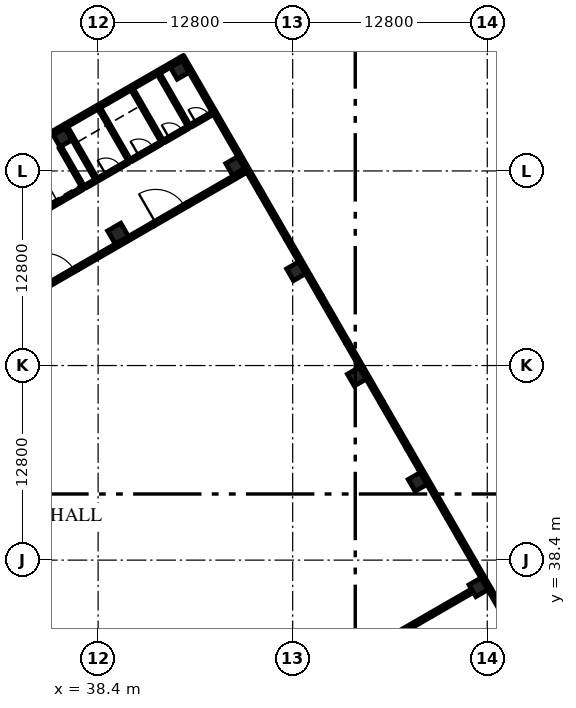
"""IFC4 building model, lengths in metres.
Left out: names, types, materials, properties, quantities, classifications, styles, units other than length and angle.
Written with IfcOpenShell. Run it as: python <this file> out.ifc"""

import sys

from ifc_helpers import new_model, si_unit, direction, frame, frame_2d, origin, origin_2d, place, context, subcontext, project, spatial, rectangle, extrude, element, fill, save


model = new_model("IFC4")
c1 = context("Model", 3, precision=1e-05, world=origin(), true_north=direction((0.0, 1.0)))
c2 = subcontext(c1, "Body", "Model", "MODEL_VIEW")
j1 = project(units=[si_unit("LENGTHUNIT", "METRE"), si_unit("PLANEANGLEUNIT", "RADIAN")], contexts=[c1])
p1 = place(None, origin())
s1 = spatial("IfcSite", under=j1, at=p1, CompositionType="ELEMENT")
p2 = place(p1, origin())
s2 = spatial("IfcBuilding", under=s1, at=p2, CompositionType="ELEMENT")
p3 = place(p2, frame((0.0, 0.0, 6.0)))
s3 = spatial("IfcBuildingStorey", under=s2, at=p3, CompositionType="ELEMENT", Elevation=6.0)
for number, where, z_axis, x_axis in (
    (1, (63.417, 36.614, 0.0), (0.0, 0.0, 1.0), (-0.5, 0.866, 0.0)),
    (2, (59.417, 43.542, 0.0), (0.0, 0.0, 1.0), (-0.5, 0.866, 0.0)),
    (3, (55.417, 50.47, 0.0), (0.0, 0.0, 1.0), (-0.5, 0.866, 0.0)),
    (4, (51.417, 57.399, 0.0), (0.0, 0.0, 1.0), (-0.5, 0.866, 0.0)),
):
    element("IfcColumn", number, at=place(p3, frame(where, z_axis=z_axis, x_axis=x_axis)), inside=s3, PredefinedType="COLUMN", context=c2, shape_type="SweptSolid", body=[
        extrude(rectangle(XDim=0.9, YDim=0.9, at=origin_2d()), origin(), (0.0, 0.0, 1.0), 5.4),
    ])
p4 = place(p3, frame((39.71, 59.877, 0.0), z_axis=(0.0, 0.0, 1.0), x_axis=(-0.5, 0.866025403784, 0.0)))
e5 = element("IfcColumn", 5, at=p4, inside=s3, PredefinedType="COLUMN", context=c2, shape_type="SweptSolid", body=[
    extrude(rectangle(XDim=1.0, YDim=1.0, at=origin_2d()), origin(), (0.0, 0.0, 1.0), 5.4),
])
for number, where, z_axis, x_axis in (
    (6, (47.417, 64.327, 0.0), (0.0, 0.0, 1.0), (-0.5, 0.866, 0.0)),
    (7, (36.06, 66.199, 0.0), (0.0, 0.0, 1.0), (-0.5, 0.866, 0.0)),
    (8, (43.767, 70.649, 0.0), (0.0, 0.0, 1.0), (-0.5, 0.866, 0.0)),
):
    element("IfcColumn", number, at=place(p3, frame(where, z_axis=z_axis, x_axis=x_axis)), inside=s3, PredefinedType="COLUMN", context=c2, shape_type="SweptSolid", body=[
        extrude(rectangle(XDim=0.9, YDim=0.9, at=origin_2d()), origin(), (0.0, 0.0, 1.0), 5.4),
    ])
p5 = place(p3, frame((63.172, 38.189, 0.0), z_axis=(0.0, 0.0, 1.0), x_axis=(0.499982597115, -0.866035451112, 0.0)))
e9 = element("IfcWall", 9, at=p5, inside=s3, PredefinedType="SOLIDWALL", context=c2, shape_type="SweptSolid", body=[
    extrude(rectangle(XDim=3.737, YDim=0.25, at=frame_2d((1.869, 0.0))), origin(), (0.0, 0.0, 1.0), 5.1),
])
p6 = place(p3, frame((61.422, 41.22, 0.0), z_axis=(0.0, 0.0, 1.0), x_axis=(0.499980071345, -0.866036909293, 0.0)))
e10 = element("IfcWall", 10, at=p6, inside=s3, PredefinedType="SOLIDWALL", context=c2, shape_type="SweptSolid", body=[
    extrude(rectangle(XDim=3.5, YDim=0.25, at=frame_2d((1.75, 0.0))), origin(), (0.0, 0.0, 1.0), 5.1),
])
p7 = place(p6, frame((0.25, 0.0, 1.0)))
e11 = element("IfcOpeningElement", 11, at=p7, cuts=e10, PredefinedType="OPENING", context=c2, shape_type="SweptSolid", body=[
    extrude(rectangle(XDim=3.0, YDim=2.8, at=frame_2d((1.5, 1.4))), frame((0.0, 0.135, 0.0), z_axis=(0.0, -1.0, 0.0), x_axis=(1.0, 0.0, 0.0)), (0.0, 0.0, 1.0), 0.27),
])
p8 = place(p3, frame((58.79, 45.778, 0.0), z_axis=(0.0, 0.0, 1.0), x_axis=(0.50001558016, -0.866016408388, 0.0)))
e12 = element("IfcWall", 12, at=p8, inside=s3, PredefinedType="SOLIDWALL", context=c2, shape_type="SweptSolid", body=[
    extrude(rectangle(XDim=5.263, YDim=0.25, at=frame_2d((2.631, 0.0))), origin(), (0.0, 0.0, 1.0), 5.1),
])
p9 = place(p3, frame((57.04, 48.809, 0.0), z_axis=(0.0, 0.0, 1.0), x_axis=(0.500010275428, -0.866019471182, 0.0)))
e13 = element("IfcWall", 13, at=p9, inside=s3, PredefinedType="SOLIDWALL", context=c2, shape_type="SweptSolid", body=[
    extrude(rectangle(XDim=3.5, YDim=0.25, at=frame_2d((1.75, 0.0))), origin(), (0.0, 0.0, 1.0), 5.1),
])
p10 = place(p9, frame((0.25, 0.0, 1.0)))
e14 = element("IfcOpeningElement", 14, at=p10, cuts=e13, PredefinedType="OPENING", context=c2, shape_type="SweptSolid", body=[
    extrude(rectangle(XDim=3.0, YDim=2.8, at=frame_2d((1.5, 1.4))), frame((0.0, 0.135, 0.0), z_axis=(0.0, -1.0, 0.0), x_axis=(1.0, 0.0, 0.0)), (0.0, 0.0, 1.0), 0.27),
])
p11 = place(p3, frame((54.79, 52.707, 0.0), z_axis=(0.0, 0.0, 1.0), x_axis=(0.499990139034, -0.866031096941, 0.0)))
e15 = element("IfcWall", 15, at=p11, inside=s3, PredefinedType="SOLIDWALL", context=c2, shape_type="SweptSolid", body=[
    extrude(rectangle(XDim=4.5, YDim=0.25, at=frame_2d((2.25, 0.0))), origin(), (0.0, 0.0, 1.0), 5.1),
])
p12 = place(p3, frame((53.04, 55.738, 0.0), z_axis=(0.0, 0.0, 1.0), x_axis=(0.500010275428, -0.866019471182, 0.0)))
e16 = element("IfcWall", 16, at=p12, inside=s3, PredefinedType="SOLIDWALL", context=c2, shape_type="SweptSolid", body=[
    extrude(rectangle(XDim=3.5, YDim=0.25, at=frame_2d((1.75, 0.0))), origin(), (0.0, 0.0, 1.0), 5.1),
])
p13 = place(p12, frame((0.25, 0.0, 1.0)))
e17 = element("IfcOpeningElement", 17, at=p13, cuts=e16, PredefinedType="OPENING", context=c2, shape_type="SweptSolid", body=[
    extrude(rectangle(XDim=3.0, YDim=2.8, at=frame_2d((1.5, 1.4))), frame((0.0, 0.135, 0.0), z_axis=(0.0, -1.0, 0.0), x_axis=(1.0, 0.0, 0.0)), (0.0, 0.0, 1.0), 0.27),
])
p14 = place(p3, frame((50.821, 59.581, 0.0), z_axis=(0.0, 0.0, 1.0), x_axis=(0.499990705068, -0.866030770149, 0.0)))
e18 = element("IfcWall", 18, at=p14, inside=s3, PredefinedType="SOLIDWALL", context=c2, shape_type="SweptSolid", body=[
    extrude(rectangle(XDim=4.438, YDim=0.25, at=frame_2d((2.219, 0.0))), origin(), (0.0, 0.0, 1.0), 5.1),
])
p15 = place(p3, frame((49.071, 62.612, 0.0), z_axis=(0.0, 0.0, 1.0), x_axis=(0.500010275428, -0.866019471182, 0.0)))
e19 = element("IfcWall", 19, at=p15, inside=s3, PredefinedType="SOLIDWALL", context=c2, shape_type="SweptSolid", body=[
    extrude(rectangle(XDim=3.5, YDim=0.25, at=frame_2d((1.75, 0.0))), origin(), (0.0, 0.0, 1.0), 5.1),
])
p16 = place(p15, frame((0.25, 0.0, 1.0)))
e20 = element("IfcOpeningElement", 20, at=p16, cuts=e19, PredefinedType="OPENING", context=c2, shape_type="SweptSolid", body=[
    extrude(rectangle(XDim=3.0, YDim=2.8, at=frame_2d((1.5, 1.4))), frame((0.0, 0.135, 0.0), z_axis=(0.0, -1.0, 0.0), x_axis=(1.0, 0.0, 0.0)), (0.0, 0.0, 1.0), 0.27),
])
p17 = place(p3, frame((43.915, 71.542, 0.0), z_axis=(0.0, 0.0, 1.0), x_axis=(0.500001855621, -0.866024332438, 0.0)))
e21 = element("IfcWall", 21, at=p17, inside=s3, PredefinedType="SOLIDWALL", context=c2, shape_type="SweptSolid", body=[
    extrude(rectangle(XDim=10.312, YDim=0.25, at=frame_2d((5.156, 0.0))), origin(), (0.0, 0.0, 1.0), 5.1),
])
p18 = place(p3, frame((27.935, 62.172, 0.0), z_axis=(0.0, 0.0, 1.0), x_axis=(0.86604045752, 0.499973925258, 0.0)))
e22 = element("IfcWall", 22, at=p18, inside=s3, PredefinedType="SOLIDWALL", context=c2, shape_type="SweptSolid", body=[
    extrude(rectangle(XDim=8.6, YDim=0.25, at=frame_2d((4.3, 0.0))), origin(), (0.0, 0.0, 1.0), 5.1),
])
p19 = place(p3, frame((36.249, 66.972, 0.0), z_axis=(0.0, 0.0, 1.0), x_axis=(0.866013253925, 0.500021043584, 0.0)))
e23 = element("IfcWall", 23, at=p19, inside=s3, PredefinedType="SOLIDWALL", context=c2, shape_type="SweptSolid", body=[
    extrude(rectangle(XDim=8.8, YDim=0.25, at=frame_2d((4.4, 0.0))), origin(), (0.0, 0.0, 1.0), 5.1),
])
p20 = place(p3, frame((35.383, 66.472, 0.0), z_axis=(0.0, 0.0, 1.0), x_axis=(0.866010750942, 0.50002537861, 0.0)))
e24 = element("IfcWall", 24, at=p20, inside=s3, PredefinedType="SOLIDWALL", context=c2, shape_type="SweptSolid", body=[
    extrude(rectangle(XDim=1.0, YDim=0.25, at=frame_2d((0.5, 0.0))), origin(), (0.0, 0.0, 1.0), 5.1),
])
p21 = place(p3, frame((37.445, 62.899, 0.0), z_axis=(0.0, 0.0, 1.0), x_axis=(-0.500026960575, 0.86600983753, 0.0)))
e25 = element("IfcWall", 25, at=p21, inside=s3, PredefinedType="SOLIDWALL", context=c2, shape_type="SweptSolid", body=[
    extrude(rectangle(XDim=3.1, YDim=0.2, at=frame_2d((1.55, 0.0))), origin(), (0.0, 0.0, 1.0), 5.1),
])
p22 = place(p3, frame((31.599, 59.524, 0.0), z_axis=(0.0, 0.0, 1.0), x_axis=(0.866027239912, 0.49999681972, 0.0)))
e26 = element("IfcWall", 26, at=p22, inside=s3, PredefinedType="SOLIDWALL", context=c2, shape_type="SweptSolid", body=[
    extrude(rectangle(XDim=6.65, YDim=0.2, at=frame_2d((3.325, 0.0))), origin(), (0.0, 0.0, 1.0), 5.1),
])
for number, where, z_axis, x_axis in (
    (27, (38.311, 63.399, 0.0), (0.0, 0.0, 1.0), (-0.5, 0.866, 0.0)),
    (28, (40.476, 64.649, 0.0), (0.0, 0.0, 1.0), (-0.5, 0.866, 0.0)),
    (29, (42.641, 65.899, 0.0), (0.0, 0.0, 1.0), (-0.5, 0.866, 0.0)),
):
    element("IfcWall", number, at=place(p3, frame(where, z_axis=z_axis, x_axis=x_axis)), inside=s3, PredefinedType="SOLIDWALL", context=c2, shape_type="SweptSolid", body=[
        extrude(rectangle(XDim=4.0, YDim=0.2, at=frame_2d((2.0, 0.0))), origin(), (0.0, 0.0, 1.0), 5.1),
    ])
p23 = place(p3, frame((38.398, 63.449, 0.0), z_axis=(0.0, 0.0, 1.0), x_axis=(0.86602648383, 0.499998129301, 0.0)))
e30 = element("IfcWall", 30, at=p23, inside=s3, PredefinedType="SOLIDWALL", context=c2, shape_type="SweptSolid", body=[
    extrude(rectangle(XDim=2.3, YDim=0.2, at=frame_2d((1.15, 0.0))), origin(), (0.0, 0.0, 1.0), 5.1),
])
p24 = place(p23, frame((0.6, 0.0, 0.0)))
e31 = element("IfcOpeningElement", 31, at=p24, cuts=e30, PredefinedType="OPENING", context=c2, shape_type="SweptSolid", body=[
    extrude(rectangle(XDim=1.1, YDim=2.1, at=frame_2d((0.55, 1.05))), frame((0.0, 0.11, 0.0), z_axis=(0.0, -1.0, 0.0), x_axis=(1.0, 0.0, 0.0)), (0.0, 0.0, 1.0), 0.22),
])
p25 = place(p3, frame((40.563, 64.699, 0.0), z_axis=(0.0, 0.0, 1.0), x_axis=(0.86602648383, 0.499998129301, 0.0)))
e32 = element("IfcWall", 32, at=p25, inside=s3, PredefinedType="SOLIDWALL", context=c2, shape_type="SweptSolid", body=[
    extrude(rectangle(XDim=2.3, YDim=0.2, at=frame_2d((1.15, 0.0))), origin(), (0.0, 0.0, 1.0), 5.1),
])
p26 = place(p25, frame((0.6, 0.0, 0.0)))
e33 = element("IfcOpeningElement", 33, at=p26, cuts=e32, PredefinedType="OPENING", context=c2, shape_type="SweptSolid", body=[
    extrude(rectangle(XDim=1.1, YDim=2.1, at=frame_2d((0.55, 1.05))), frame((0.0, 0.11, 0.0), z_axis=(0.0, -1.0, 0.0), x_axis=(1.0, 0.0, 0.0)), (0.0, 0.0, 1.0), 0.22),
])
p27 = place(p3, frame((26.178, 15.114, 0.0), z_axis=(0.0, 0.0, 1.0), x_axis=(0.866025540551, 0.499999763114, 0.0)))
e34 = element("IfcWall", 34, at=p27, inside=s3, PredefinedType="SOLIDWALL", context=c2, shape_type="SweptSolid", body=[
    extrude(rectangle(XDim=39.4, YDim=0.25, at=frame_2d((19.7, 0.0))), origin(), (0.0, 0.0, 1.0), 10.2),
])
p28 = place(p3, frame((60.3, 34.814, 0.0), z_axis=(0.0, 0.0, 1.0), x_axis=(0.866035871367, 0.499981869177, 0.0)))
e35 = element("IfcWall", 35, at=p28, inside=s3, PredefinedType="SOLIDWALL", context=c2, shape_type="SweptSolid", body=[
    extrude(rectangle(XDim=3.15, YDim=0.25, at=frame_2d((1.575, 0.0))), origin(), (0.0, 0.0, 1.0), 4.5),
])
p29 = place(p3, frame((34.696, 56.26, 0.0), z_axis=(0.0, 0.0, 1.0), x_axis=(0.866019956843, 0.50000943426, 0.0)))
e36 = element("IfcWall", 36, at=p29, inside=s3, PredefinedType="SOLIDWALL", context=c2, shape_type="SweptSolid", body=[
    extrude(rectangle(XDim=2.7, YDim=0.25, at=frame_2d((1.35, 0.0))), origin(), (0.0, 0.0, 1.0), 4.5),
])
p30 = place(p29, frame((0.25, 0.0, 0.0)))
e37 = element("IfcOpeningElement", 37, at=p30, cuts=e36, PredefinedType="OPENING", context=c2, shape_type="SweptSolid", body=[
    extrude(rectangle(XDim=2.2, YDim=2.1, at=frame_2d((1.1, 1.05))), frame((0.0, 0.135, 0.0), z_axis=(0.0, -1.0, 0.0), x_axis=(1.0, 0.0, 0.0)), (0.0, 0.0, 1.0), 0.27),
])
p31 = place(p3, frame((37.034, 57.611, 0.0), z_axis=(0.0, 0.0, 1.0), x_axis=(0.866015111908, 0.50001782563, 0.0)))
e38 = element("IfcWall", 38, at=p31, inside=s3, PredefinedType="SOLIDWALL", context=c2, shape_type="SweptSolid", body=[
    extrude(rectangle(XDim=5.7, YDim=0.25, at=frame_2d((2.85, 0.0))), origin(), (0.0, 0.0, 1.0), 4.5),
])
p32 = place(p3, frame((41.971, 60.461, 0.0), z_axis=(0.0, 0.0, 1.0), x_axis=(0.866059108428, 0.4999416173, 0.0)))
e39 = element("IfcWall", 39, at=p32, inside=s3, PredefinedType="SOLIDWALL", context=c2, shape_type="SweptSolid", body=[
    extrude(rectangle(XDim=2.7, YDim=0.25, at=frame_2d((1.35, 0.0))), origin(), (0.0, 0.0, 1.0), 4.5),
])
p33 = place(p32, frame((0.25, 0.0, 0.0)))
e40 = element("IfcOpeningElement", 40, at=p33, cuts=e39, PredefinedType="OPENING", context=c2, shape_type="SweptSolid", body=[
    extrude(rectangle(XDim=2.2, YDim=2.1, at=frame_2d((1.1, 1.05))), frame((0.0, 0.135, 0.0), z_axis=(0.0, -1.0, 0.0), x_axis=(1.0, 0.0, 0.0)), (0.0, 0.0, 1.0), 0.27),
])
p34 = place(p3, frame((44.309, 61.811, 0.0), z_axis=(0.0, 0.0, 1.0), x_axis=(0.866018331238, 0.50001224981, 0.0)))
e41 = element("IfcWall", 41, at=p34, inside=s3, PredefinedType="SOLIDWALL", context=c2, shape_type="SweptSolid", body=[
    extrude(rectangle(XDim=4.4, YDim=0.25, at=frame_2d((2.2, 0.0))), origin(), (0.0, 0.0, 1.0), 4.5),
])
p35 = place(p3, frame((44.395, 66.912, 0.0), z_axis=(0.0, 0.0, 1.0), x_axis=(-0.49999894854, 0.866026010844, 0.0)))
e42 = element("IfcWall", 42, at=p35, inside=s3, PredefinedType="PARTITIONING", context=c2, shape_type="SweptSolid", body=[
    extrude(rectangle(XDim=4.0, YDim=0.2, at=frame_2d((2.0, 0.0))), origin(), (0.0, 0.0, 1.0), 4.5),
])
p36 = place(p3, frame((42.728, 65.949, 0.0), z_axis=(0.0, 0.0, 1.0), x_axis=(0.866036312054, 0.499981105847, 0.0)))
e43 = element("IfcWall", 43, at=p36, inside=s3, PredefinedType="PARTITIONING", context=c2, shape_type="SweptSolid", body=[
    extrude(rectangle(XDim=1.825, YDim=0.2, at=frame_2d((0.912, 0.0))), origin(), (0.0, 0.0, 1.0), 4.5),
])
p37 = place(p36, frame((0.413, 0.0, 0.0)))
e44 = element("IfcOpeningElement", 44, at=p37, cuts=e43, PredefinedType="OPENING", context=c2, shape_type="SweptSolid", body=[
    extrude(rectangle(XDim=1.0, YDim=2.1, at=frame_2d((0.5, 1.05))), frame((0.0, 0.11, 0.0), z_axis=(0.0, -1.0, 0.0), x_axis=(1.0, 0.0, 0.0)), (0.0, 0.0, 1.0), 0.22),
])
p38 = place(p3, frame((44.481, 66.962, 0.0), z_axis=(0.0, 0.0, 1.0), x_axis=(0.866027799164, 0.499995851058, 0.0)))
e45 = element("IfcWall", 45, at=p38, inside=s3, PredefinedType="PARTITIONING", context=c2, shape_type="SweptSolid", body=[
    extrude(rectangle(XDim=1.675, YDim=0.2, at=frame_2d((0.837, 0.0))), origin(), (0.0, 0.0, 1.0), 4.5),
])
p39 = place(p38, frame((0.413, 0.0, 0.0)))
e46 = element("IfcOpeningElement", 46, at=p39, cuts=e45, PredefinedType="OPENING", context=c2, shape_type="SweptSolid", body=[
    extrude(rectangle(XDim=1.0, YDim=2.1, at=frame_2d((0.5, 1.05))), frame((0.0, 0.11, 0.0), z_axis=(0.0, -1.0, 0.0), x_axis=(1.0, 0.0, 0.0)), (0.0, 0.0, 1.0), 0.22),
])
p40 = place(p3, frame((37.531, 62.949, 0.0), z_axis=(0.0, 0.0, 1.0), x_axis=(0.866094119867, 0.499880961361, 0.0)))
e47 = element("IfcWall", 47, at=p40, inside=s3, PredefinedType="PARTITIONING", context=c2, shape_type="SweptSolid", body=[
    extrude(rectangle(XDim=0.8, YDim=0.2, at=frame_2d((0.4, 0.0))), origin(), (0.0, 0.0, 1.0), 4.5),
])
p41 = place(p7, origin())
e48 = element("IfcWindow", 48, at=p41, inside=s3, PartitioningType="SINGLE_PANEL", PredefinedType="WINDOW", context=c2, shape_type="SweptSolid", body=[
    extrude(rectangle(XDim=3.0, YDim=2.8, at=frame_2d((1.5, 1.4))), frame((0.0, 0.03, 0.0), z_axis=(0.0, -1.0, 0.0), x_axis=(1.0, 0.0, 0.0)), (0.0, 0.0, 1.0), 0.06),
])
fill(e11, e48)
p42 = place(p10, origin())
e49 = element("IfcWindow", 49, at=p42, inside=s3, PartitioningType="SINGLE_PANEL", PredefinedType="WINDOW", context=c2, shape_type="SweptSolid", body=[
    extrude(rectangle(XDim=3.0, YDim=2.8, at=frame_2d((1.5, 1.4))), frame((0.0, 0.03, 0.0), z_axis=(0.0, -1.0, 0.0), x_axis=(1.0, 0.0, 0.0)), (0.0, 0.0, 1.0), 0.06),
])
fill(e14, e49)
p43 = place(p13, origin())
e50 = element("IfcWindow", 50, at=p43, inside=s3, PartitioningType="SINGLE_PANEL", PredefinedType="WINDOW", context=c2, shape_type="SweptSolid", body=[
    extrude(rectangle(XDim=3.0, YDim=2.8, at=frame_2d((1.5, 1.4))), frame((0.0, 0.03, 0.0), z_axis=(0.0, -1.0, 0.0), x_axis=(1.0, 0.0, 0.0)), (0.0, 0.0, 1.0), 0.06),
])
fill(e17, e50)
p44 = place(p16, origin())
e51 = element("IfcWindow", 51, at=p44, inside=s3, PartitioningType="SINGLE_PANEL", PredefinedType="WINDOW", context=c2, shape_type="SweptSolid", body=[
    extrude(rectangle(XDim=3.0, YDim=2.8, at=frame_2d((1.5, 1.4))), frame((0.0, 0.03, 0.0), z_axis=(0.0, -1.0, 0.0), x_axis=(1.0, 0.0, 0.0)), (0.0, 0.0, 1.0), 0.06),
])
fill(e20, e51)
p45 = place(p24, origin())
e52 = element("IfcDoor", 52, at=p45, inside=s3, OperationType="DOUBLE_DOOR_SLIDING", PredefinedType="DOOR", context=c2, shape_type="SweptSolid", body=[
    extrude(rectangle(XDim=1.1, YDim=2.1, at=frame_2d((0.55, 1.05))), frame((0.0, 0.025, 0.0), z_axis=(0.0, -1.0, 0.0), x_axis=(1.0, 0.0, 0.0)), (0.0, 0.0, 1.0), 0.05),
])
fill(e31, e52)
p46 = place(p26, origin())
e53 = element("IfcDoor", 53, at=p46, inside=s3, OperationType="DOUBLE_DOOR_SLIDING", PredefinedType="DOOR", context=c2, shape_type="SweptSolid", body=[
    extrude(rectangle(XDim=1.1, YDim=2.1, at=frame_2d((0.55, 1.05))), frame((0.0, 0.025, 0.0), z_axis=(0.0, -1.0, 0.0), x_axis=(1.0, 0.0, 0.0)), (0.0, 0.0, 1.0), 0.05),
])
fill(e33, e53)
p47 = place(p30, origin())
e54 = element("IfcDoor", 54, at=p47, inside=s3, OperationType="DOUBLE_DOOR_SINGLE_SWING", PredefinedType="DOOR", context=c2, shape_type="SweptSolid", body=[
    extrude(rectangle(XDim=2.2, YDim=2.1, at=frame_2d((1.1, 1.05))), frame((0.0, 0.025, 0.0), z_axis=(0.0, -1.0, 0.0), x_axis=(1.0, 0.0, 0.0)), (0.0, 0.0, 1.0), 0.05),
])
fill(e37, e54)
p48 = place(p33, origin())
e55 = element("IfcDoor", 55, at=p48, inside=s3, OperationType="DOUBLE_DOOR_SINGLE_SWING", PredefinedType="DOOR", context=c2, shape_type="SweptSolid", body=[
    extrude(rectangle(XDim=2.2, YDim=2.1, at=frame_2d((1.1, 1.05))), frame((0.0, 0.025, 0.0), z_axis=(0.0, -1.0, 0.0), x_axis=(1.0, 0.0, 0.0)), (0.0, 0.0, 1.0), 0.05),
])
fill(e40, e55)
p49 = place(p37, origin())
e56 = element("IfcDoor", 56, at=p49, inside=s3, OperationType="SINGLE_SWING_LEFT", PredefinedType="DOOR", context=c2, shape_type="SweptSolid", body=[
    extrude(rectangle(XDim=1.0, YDim=2.1, at=frame_2d((0.5, 1.05))), frame((0.0, 0.025, 0.0), z_axis=(0.0, -1.0, 0.0), x_axis=(1.0, 0.0, 0.0)), (0.0, 0.0, 1.0), 0.05),
])
fill(e44, e56)
p50 = place(p39, origin())
e57 = element("IfcDoor", 57, at=p50, inside=s3, OperationType="SINGLE_SWING_LEFT", PredefinedType="DOOR", context=c2, shape_type="SweptSolid", body=[
    extrude(rectangle(XDim=1.0, YDim=2.1, at=frame_2d((0.5, 1.05))), frame((0.0, 0.025, 0.0), z_axis=(0.0, -1.0, 0.0), x_axis=(1.0, 0.0, 0.0)), (0.0, 0.0, 1.0), 0.05),
])
fill(e46, e57)
save(model, sys.argv[1])
